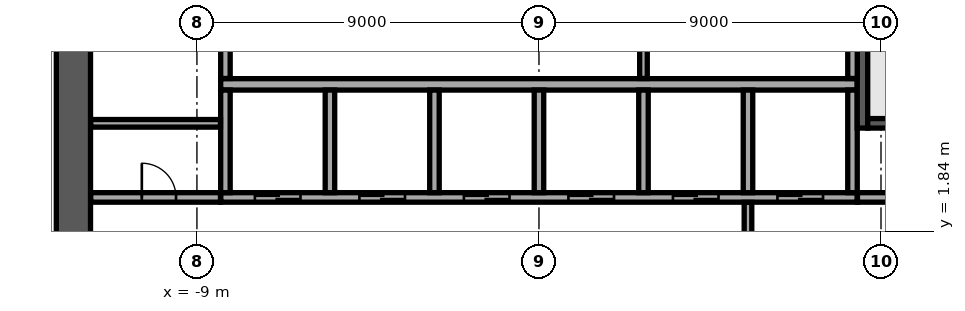
"""IFC4 building model, lengths in metres.
Left out: names, types, materials, properties, quantities, classifications, styles, units other than length and angle.
Written with IfcOpenShell. Run it as: python <this file> out.ifc"""

import sys

from ifc_helpers import new_model, si_unit, direction, frame, frame_2d, origin, place, context, subcontext, project, spatial, rectangle, extrude, element, fill, save


model = new_model("IFC4")
c1 = context("Model", 3, precision=1e-05, world=origin(), true_north=direction((0.0, 1.0)))
c2 = subcontext(c1, "Body", "Model", "MODEL_VIEW")
j1 = project(units=[si_unit("LENGTHUNIT", "METRE"), si_unit("PLANEANGLEUNIT", "RADIAN")], contexts=[c1])
p1 = place(None, origin())
s1 = spatial("IfcSite", under=j1, at=p1, CompositionType="ELEMENT")
p2 = place(p1, origin())
s2 = spatial("IfcBuilding", under=s1, at=p2, CompositionType="ELEMENT")
p3 = place(p2, frame((0.0, 0.0, 197.3)))
s3 = spatial("IfcBuildingStorey", under=s2, at=p3, CompositionType="ELEMENT", Elevation=197.3)
p4 = place(p3, frame((-12.25, -11.8, 0.0), z_axis=(0.0, 0.0, 1.0), x_axis=(0.0, 1.0, 0.0)))
e1 = element("IfcWall", 1, at=p4, inside=s3, PredefinedType="SHEAR", context=c2, shape_type="SweptSolid", body=[
    extrude(rectangle(XDim=23.6, YDim=0.9, at=frame_2d((11.8, 0.0))), origin(), (0.0, 0.0, 1.0), 3.62),
])
p5 = place(p4, frame((10.6, 0.0, 0.0)))
e2 = element("IfcOpeningElement", 2, at=p5, cuts=e1, PredefinedType="OPENING", context=c2, shape_type="SweptSolid", body=[
    extrude(rectangle(XDim=2.4, YDim=2.4, at=frame_2d((1.2, 1.2))), frame((0.0, 0.46, 0.0), z_axis=(0.0, -1.0, 0.0), x_axis=(1.0, 0.0, 0.0)), (0.0, 0.0, 1.0), 0.92),
])
p6 = place(p3, frame((-8.375, 5.7, 0.0), z_axis=(0.0, 0.0, 1.0), x_axis=(1.0, 0.0, 0.0)))
e3 = element("IfcWall", 3, at=p6, inside=s3, PredefinedType="SOLIDWALL", context=c2, shape_type="SweptSolid", body=[
    extrude(rectangle(XDim=16.75, YDim=0.3, at=frame_2d((8.375, 0.0))), origin(), (0.0, 0.0, 1.0), 3.62),
])
p7 = place(p3, frame((-8.375, 2.725, 0.0), z_axis=(0.0, 0.0, 1.0), x_axis=(1.0, 0.0, 0.0)))
e4 = element("IfcWall", 4, at=p7, inside=s3, PredefinedType="SOLIDWALL", context=c2, shape_type="SweptSolid", body=[
    extrude(rectangle(XDim=16.75, YDim=0.25, at=frame_2d((8.375, 0.0))), origin(), (0.0, 0.0, 1.0), 3.62),
])
p8 = place(p7, frame((0.9, 0.0, 0.0)))
e5 = element("IfcOpeningElement", 5, at=p8, cuts=e4, PredefinedType="OPENING", context=c2, shape_type="SweptSolid", body=[
    extrude(rectangle(XDim=1.2, YDim=2.1, at=frame_2d((0.6, 1.05))), frame((0.0, 0.135, 0.0), z_axis=(0.0, -1.0, 0.0), x_axis=(1.0, 0.0, 0.0)), (0.0, 0.0, 1.0), 0.27),
])
p9 = place(p7, frame((3.65, 0.0, 0.0)))
e6 = element("IfcOpeningElement", 6, at=p9, cuts=e4, PredefinedType="OPENING", context=c2, shape_type="SweptSolid", body=[
    extrude(rectangle(XDim=1.2, YDim=2.1, at=frame_2d((0.6, 1.05))), frame((0.0, 0.135, 0.0), z_axis=(0.0, -1.0, 0.0), x_axis=(1.0, 0.0, 0.0)), (0.0, 0.0, 1.0), 0.27),
])
p10 = place(p7, frame((6.4, 0.0, 0.0)))
e7 = element("IfcOpeningElement", 7, at=p10, cuts=e4, PredefinedType="OPENING", context=c2, shape_type="SweptSolid", body=[
    extrude(rectangle(XDim=1.2, YDim=2.1, at=frame_2d((0.6, 1.05))), frame((0.0, 0.135, 0.0), z_axis=(0.0, -1.0, 0.0), x_axis=(1.0, 0.0, 0.0)), (0.0, 0.0, 1.0), 0.27),
])
p11 = place(p7, frame((9.15, 0.0, 0.0)))
e8 = element("IfcOpeningElement", 8, at=p11, cuts=e4, PredefinedType="OPENING", context=c2, shape_type="SweptSolid", body=[
    extrude(rectangle(XDim=1.2, YDim=2.1, at=frame_2d((0.6, 1.05))), frame((0.0, 0.135, 0.0), z_axis=(0.0, -1.0, 0.0), x_axis=(1.0, 0.0, 0.0)), (0.0, 0.0, 1.0), 0.27),
])
p12 = place(p7, frame((11.9, 0.0, 0.0)))
e9 = element("IfcOpeningElement", 9, at=p12, cuts=e4, PredefinedType="OPENING", context=c2, shape_type="SweptSolid", body=[
    extrude(rectangle(XDim=1.2, YDim=2.1, at=frame_2d((0.6, 1.05))), frame((0.0, 0.135, 0.0), z_axis=(0.0, -1.0, 0.0), x_axis=(1.0, 0.0, 0.0)), (0.0, 0.0, 1.0), 0.27),
])
p13 = place(p7, frame((14.65, 0.0, 0.0)))
e10 = element("IfcOpeningElement", 10, at=p13, cuts=e4, PredefinedType="OPENING", context=c2, shape_type="SweptSolid", body=[
    extrude(rectangle(XDim=1.2, YDim=2.1, at=frame_2d((0.6, 1.05))), frame((0.0, 0.135, 0.0), z_axis=(0.0, -1.0, 0.0), x_axis=(1.0, 0.0, 0.0)), (0.0, 0.0, 1.0), 0.27),
])
for number, where, z_axis, x_axis in (
    (11, (-8.25, 2.85, 0.0), (0.0, 0.0, 1.0), (0.0, 1.0, 0.0)),
    (12, (-5.5, 2.85, 0.0), (0.0, 0.0, 1.0), (0.0, 1.0, 0.0)),
    (13, (-2.75, 2.85, 0.0), (0.0, 0.0, 1.0), (0.0, 1.0, 0.0)),
    (14, (0.0, 2.85, 0.0), (0.0, 0.0, 1.0), (0.0, 1.0, 0.0)),
    (15, (2.75, 2.85, 0.0), (0.0, 0.0, 1.0), (0.0, 1.0, 0.0)),
    (16, (5.5, 2.85, 0.0), (0.0, 0.0, 1.0), (0.0, 1.0, 0.0)),
    (17, (8.25, 2.85, 0.0), (0.0, 0.0, 1.0), (0.0, 1.0, 0.0)),
):
    element("IfcWall", number, at=place(p3, frame(where, z_axis=z_axis, x_axis=x_axis)), inside=s3, PredefinedType="SOLIDWALL", context=c2, shape_type="SweptSolid", body=[
        extrude(rectangle(XDim=2.7, YDim=0.25, at=frame_2d((1.35, 0.0))), origin(), (0.0, 0.0, 1.0), 3.62),
    ])
p14 = place(p3, frame((8.512, 4.55, 0.0), z_axis=(0.0, 0.0, 1.0), x_axis=(0.0, 1.0, 0.0)))
e18 = element("IfcWall", 18, at=p14, inside=s3, PredefinedType="SOLIDWALL", context=c2, shape_type="SweptSolid", body=[
    extrude(rectangle(XDim=7.25, YDim=0.275, at=frame_2d((3.625, 0.0))), origin(), (0.0, 0.0, 1.0), 3.62),
])
p15 = place(p14, frame((6.0, 0.0, 0.0)))
e19 = element("IfcOpeningElement", 19, at=p15, cuts=e18, PredefinedType="OPENING", context=c2, shape_type="SweptSolid", body=[
    extrude(rectangle(XDim=1.0, YDim=2.1, at=frame_2d((0.5, 1.05))), frame((0.0, 0.147, 0.0), z_axis=(0.0, -1.0, 0.0), x_axis=(1.0, 0.0, 0.0)), (0.0, 0.0, 1.0), 0.295),
])
p16 = place(p3, frame((8.65, 4.675, 0.0), z_axis=(0.0, 0.0, 1.0), x_axis=(1.0, 0.0, 0.0)))
e20 = element("IfcWall", 20, at=p16, inside=s3, PredefinedType="SOLIDWALL", context=c2, shape_type="SweptSolid", body=[
    extrude(rectangle(XDim=3.15, YDim=0.25, at=frame_2d((1.575, 0.0))), origin(), (0.0, 0.0, 1.0), 3.62),
])
p17 = place(p3, frame((5.5, -2.595, 0.0), z_axis=(0.0, 0.0, 1.0), x_axis=(0.0, 1.0, 0.0)))
e21 = element("IfcWall", 21, at=p17, inside=s3, PredefinedType="PARTITIONING", context=c2, shape_type="SweptSolid", body=[
    extrude(rectangle(XDim=5.19, YDim=0.2, at=frame_2d((2.595, 0.0))), origin(), (0.0, 0.0, 1.0), 3.62),
])
p18 = place(p17, frame((1.395, 0.0, 0.0)))
e22 = element("IfcOpeningElement", 22, at=p18, cuts=e21, PredefinedType="OPENING", context=c2, shape_type="SweptSolid", body=[
    extrude(rectangle(XDim=2.4, YDim=2.4, at=frame_2d((1.2, 1.2))), frame((0.0, 0.11, 0.0), z_axis=(0.0, -1.0, 0.0), x_axis=(1.0, 0.0, 0.0)), (0.0, 0.0, 1.0), 0.22),
])
p19 = place(p3, frame((-11.795, 2.725, 0.0), z_axis=(0.0, 0.0, 1.0), x_axis=(1.0, 0.0, 0.0)))
e23 = element("IfcWall", 23, at=p19, inside=s3, PredefinedType="PARTITIONING", context=c2, shape_type="SweptSolid", body=[
    extrude(rectangle(XDim=3.415, YDim=0.25, at=frame_2d((1.708, 0.0))), origin(), (0.0, 0.0, 1.0), 3.62),
])
p20 = place(p19, frame((1.345, 0.0, 0.0)))
e24 = element("IfcOpeningElement", 24, at=p20, cuts=e23, PredefinedType="OPENING", context=c2, shape_type="SweptSolid", body=[
    extrude(rectangle(XDim=0.9, YDim=2.1, at=frame_2d((0.45, 1.05))), frame((0.0, 0.135, 0.0), z_axis=(0.0, -1.0, 0.0), x_axis=(1.0, 0.0, 0.0)), (0.0, 0.0, 1.0), 0.27),
])
p21 = place(p3, frame((8.38, 2.725, 0.0), z_axis=(0.0, 0.0, 1.0), x_axis=(1.0, 0.0, 0.0)))
e25 = element("IfcWall", 25, at=p21, inside=s3, PredefinedType="PARTITIONING", context=c2, shape_type="SweptSolid", body=[
    extrude(rectangle(XDim=3.415, YDim=0.25, at=frame_2d((1.708, 0.0))), origin(), (0.0, 0.0, 1.0), 3.62),
])
p22 = place(p21, frame((1.17, 0.0, 0.0)))
e26 = element("IfcOpeningElement", 26, at=p22, cuts=e25, PredefinedType="OPENING", context=c2, shape_type="SweptSolid", body=[
    extrude(rectangle(XDim=0.9, YDim=2.1, at=frame_2d((0.45, 1.05))), frame((0.0, 0.135, 0.0), z_axis=(0.0, -1.0, 0.0), x_axis=(1.0, 0.0, 0.0)), (0.0, 0.0, 1.0), 0.27),
])
p23 = place(p3, frame((-11.795, 4.675, 0.0), z_axis=(0.0, 0.0, 1.0), x_axis=(1.0, 0.0, 0.0)))
e27 = element("IfcWall", 27, at=p23, inside=s3, PredefinedType="PARTITIONING", context=c2, shape_type="SweptSolid", body=[
    extrude(rectangle(XDim=3.415, YDim=0.2, at=frame_2d((1.708, 0.0))), origin(), (0.0, 0.0, 1.0), 3.62),
])
p24 = place(p3, frame((-8.25, 5.855, 0.0), z_axis=(0.0, 0.0, 1.0), x_axis=(0.0, 1.0, 0.0)))
e28 = element("IfcWall", 28, at=p24, inside=s3, PredefinedType="PARTITIONING", context=c2, shape_type="SweptSolid", body=[
    extrude(rectangle(XDim=2.69, YDim=0.25, at=frame_2d((1.345, 0.0))), origin(), (0.0, 0.0, 1.0), 3.62),
])
p25 = place(p3, frame((2.75, 5.855, 0.0), z_axis=(0.0, 0.0, 1.0), x_axis=(0.0, 1.0, 0.0)))
e29 = element("IfcWall", 29, at=p25, inside=s3, PredefinedType="PARTITIONING", context=c2, shape_type="SweptSolid", body=[
    extrude(rectangle(XDim=2.69, YDim=0.2, at=frame_2d((1.345, 0.0))), origin(), (0.0, 0.0, 1.0), 3.62),
])
p26 = place(p3, frame((8.25, 5.855, 0.0), z_axis=(0.0, 0.0, 1.0), x_axis=(0.0, 1.0, 0.0)))
e30 = element("IfcWall", 30, at=p26, inside=s3, PredefinedType="PARTITIONING", context=c2, shape_type="SweptSolid", body=[
    extrude(rectangle(XDim=2.69, YDim=0.25, at=frame_2d((1.345, 0.0))), origin(), (0.0, 0.0, 1.0), 3.62),
])
p27 = place(p3, frame((1.073, 34.773, 0.0), z_axis=(0.0, 0.0, 1.0), x_axis=(-0.731351780381, -0.682000420333, 0.0)))
e31 = element("IfcWall", 31, at=p27, inside=s3, PredefinedType="STANDARD", context=c2, shape_type="SweptSolid", body=[
    extrude(rectangle(XDim=49.0, YDim=0.6, at=frame_2d((24.5, 0.0))), origin(), (0.0, 0.0, 1.0), 3.62),
])
p28 = place(p27, frame((1.227, 0.0, 0.9)))
e32 = element("IfcOpeningElement", 32, at=p28, cuts=e31, PredefinedType="OPENING", context=c2, shape_type="SweptSolid", body=[
    extrude(rectangle(XDim=2.0, YDim=2.1, at=frame_2d((1.0, 1.05))), frame((0.0, 0.31, 0.0), z_axis=(0.0, -1.0, 0.0), x_axis=(1.0, 0.0, 0.0)), (0.0, 0.0, 1.0), 0.62),
])
p29 = place(p27, frame((5.682, 0.0, 0.9)))
e33 = element("IfcOpeningElement", 33, at=p29, cuts=e31, PredefinedType="OPENING", context=c2, shape_type="SweptSolid", body=[
    extrude(rectangle(XDim=2.0, YDim=2.1, at=frame_2d((1.0, 1.05))), frame((0.0, 0.31, 0.0), z_axis=(0.0, -1.0, 0.0), x_axis=(1.0, 0.0, 0.0)), (0.0, 0.0, 1.0), 0.62),
])
p30 = place(p27, frame((14.591, 0.0, 0.9)))
e34 = element("IfcOpeningElement", 34, at=p30, cuts=e31, PredefinedType="OPENING", context=c2, shape_type="SweptSolid", body=[
    extrude(rectangle(XDim=2.0, YDim=2.1, at=frame_2d((1.0, 1.05))), frame((0.0, 0.31, 0.0), z_axis=(0.0, -1.0, 0.0), x_axis=(1.0, 0.0, 0.0)), (0.0, 0.0, 1.0), 0.62),
])
p31 = place(p27, frame((19.045, 0.0, 0.9)))
e35 = element("IfcOpeningElement", 35, at=p31, cuts=e31, PredefinedType="OPENING", context=c2, shape_type="SweptSolid", body=[
    extrude(rectangle(XDim=2.0, YDim=2.1, at=frame_2d((1.0, 1.05))), frame((0.0, 0.31, 0.0), z_axis=(0.0, -1.0, 0.0), x_axis=(1.0, 0.0, 0.0)), (0.0, 0.0, 1.0), 0.62),
])
p32 = place(p27, frame((23.5, 0.0, 0.9)))
e36 = element("IfcOpeningElement", 36, at=p32, cuts=e31, PredefinedType="OPENING", context=c2, shape_type="SweptSolid", body=[
    extrude(rectangle(XDim=2.0, YDim=2.1, at=frame_2d((1.0, 1.05))), frame((0.0, 0.31, 0.0), z_axis=(0.0, -1.0, 0.0), x_axis=(1.0, 0.0, 0.0)), (0.0, 0.0, 1.0), 0.62),
])
p33 = place(p27, frame((27.955, 0.0, 0.9)))
e37 = element("IfcOpeningElement", 37, at=p33, cuts=e31, PredefinedType="OPENING", context=c2, shape_type="SweptSolid", body=[
    extrude(rectangle(XDim=2.0, YDim=2.1, at=frame_2d((1.0, 1.05))), frame((0.0, 0.31, 0.0), z_axis=(0.0, -1.0, 0.0), x_axis=(1.0, 0.0, 0.0)), (0.0, 0.0, 1.0), 0.62),
])
p34 = place(p27, frame((32.409, 0.0, 0.9)))
e38 = element("IfcOpeningElement", 38, at=p34, cuts=e31, PredefinedType="OPENING", context=c2, shape_type="SweptSolid", body=[
    extrude(rectangle(XDim=2.0, YDim=2.1, at=frame_2d((1.0, 1.05))), frame((0.0, 0.31, 0.0), z_axis=(0.0, -1.0, 0.0), x_axis=(1.0, 0.0, 0.0)), (0.0, 0.0, 1.0), 0.62),
])
p35 = place(p27, frame((36.864, 0.0, 0.9)))
e39 = element("IfcOpeningElement", 39, at=p35, cuts=e31, PredefinedType="OPENING", context=c2, shape_type="SweptSolid", body=[
    extrude(rectangle(XDim=2.0, YDim=2.1, at=frame_2d((1.0, 1.05))), frame((0.0, 0.31, 0.0), z_axis=(0.0, -1.0, 0.0), x_axis=(1.0, 0.0, 0.0)), (0.0, 0.0, 1.0), 0.62),
])
p36 = place(p27, frame((41.318, 0.0, 0.9)))
e40 = element("IfcOpeningElement", 40, at=p36, cuts=e31, PredefinedType="OPENING", context=c2, shape_type="SweptSolid", body=[
    extrude(rectangle(XDim=2.0, YDim=2.1, at=frame_2d((1.0, 1.05))), frame((0.0, 0.31, 0.0), z_axis=(0.0, -1.0, 0.0), x_axis=(1.0, 0.0, 0.0)), (0.0, 0.0, 1.0), 0.62),
])
p37 = place(p27, frame((45.773, 0.0, 0.9)))
e41 = element("IfcOpeningElement", 41, at=p37, cuts=e31, PredefinedType="OPENING", context=c2, shape_type="SweptSolid", body=[
    extrude(rectangle(XDim=2.0, YDim=2.1, at=frame_2d((1.0, 1.05))), frame((0.0, 0.31, 0.0), z_axis=(0.0, -1.0, 0.0), x_axis=(1.0, 0.0, 0.0)), (0.0, 0.0, 1.0), 0.62),
])
p38 = place(p3, frame((35.02, 5.994, 0.0), z_axis=(0.0, 0.0, 1.0), x_axis=(-0.682002361324, 0.731349970362, 0.0)))
e42 = element("IfcWall", 42, at=p38, inside=s3, PredefinedType="STANDARD", context=c2, shape_type="SweptSolid", body=[
    extrude(rectangle(XDim=39.0, YDim=0.6, at=frame_2d((19.5, 0.0))), origin(), (0.0, 0.0, 1.0), 3.62),
])
p39 = place(p38, frame((1.217, 0.0, 0.9)))
e43 = element("IfcOpeningElement", 43, at=p39, cuts=e42, PredefinedType="OPENING", context=c2, shape_type="SweptSolid", body=[
    extrude(rectangle(XDim=1.9, YDim=2.1, at=frame_2d((0.95, 1.05))), frame((0.0, 0.31, 0.0), z_axis=(0.0, -1.0, 0.0), x_axis=(1.0, 0.0, 0.0)), (0.0, 0.0, 1.0), 0.62),
])
p40 = place(p38, frame((5.55, 0.0, 0.9)))
e44 = element("IfcOpeningElement", 44, at=p40, cuts=e42, PredefinedType="OPENING", context=c2, shape_type="SweptSolid", body=[
    extrude(rectangle(XDim=1.9, YDim=2.1, at=frame_2d((0.95, 1.05))), frame((0.0, 0.31, 0.0), z_axis=(0.0, -1.0, 0.0), x_axis=(1.0, 0.0, 0.0)), (0.0, 0.0, 1.0), 0.62),
])
p41 = place(p38, frame((9.883, 0.0, 0.9)))
e45 = element("IfcOpeningElement", 45, at=p41, cuts=e42, PredefinedType="OPENING", context=c2, shape_type="SweptSolid", body=[
    extrude(rectangle(XDim=1.9, YDim=2.1, at=frame_2d((0.95, 1.05))), frame((0.0, 0.31, 0.0), z_axis=(0.0, -1.0, 0.0), x_axis=(1.0, 0.0, 0.0)), (0.0, 0.0, 1.0), 0.62),
])
p42 = place(p38, frame((14.217, 0.0, 0.9)))
e46 = element("IfcOpeningElement", 46, at=p42, cuts=e42, PredefinedType="OPENING", context=c2, shape_type="SweptSolid", body=[
    extrude(rectangle(XDim=1.9, YDim=2.1, at=frame_2d((0.95, 1.05))), frame((0.0, 0.31, 0.0), z_axis=(0.0, -1.0, 0.0), x_axis=(1.0, 0.0, 0.0)), (0.0, 0.0, 1.0), 0.62),
])
p43 = place(p38, frame((18.55, 0.0, 0.9)))
e47 = element("IfcOpeningElement", 47, at=p43, cuts=e42, PredefinedType="OPENING", context=c2, shape_type="SweptSolid", body=[
    extrude(rectangle(XDim=1.9, YDim=2.1, at=frame_2d((0.95, 1.05))), frame((0.0, 0.31, 0.0), z_axis=(0.0, -1.0, 0.0), x_axis=(1.0, 0.0, 0.0)), (0.0, 0.0, 1.0), 0.62),
])
p44 = place(p38, frame((22.883, 0.0, 0.9)))
e48 = element("IfcOpeningElement", 48, at=p44, cuts=e42, PredefinedType="OPENING", context=c2, shape_type="SweptSolid", body=[
    extrude(rectangle(XDim=1.9, YDim=2.1, at=frame_2d((0.95, 1.05))), frame((0.0, 0.31, 0.0), z_axis=(0.0, -1.0, 0.0), x_axis=(1.0, 0.0, 0.0)), (0.0, 0.0, 1.0), 0.62),
])
p45 = place(p38, frame((27.217, 0.0, 0.9)))
e49 = element("IfcOpeningElement", 49, at=p45, cuts=e42, PredefinedType="OPENING", context=c2, shape_type="SweptSolid", body=[
    extrude(rectangle(XDim=1.9, YDim=2.1, at=frame_2d((0.95, 1.05))), frame((0.0, 0.31, 0.0), z_axis=(0.0, -1.0, 0.0), x_axis=(1.0, 0.0, 0.0)), (0.0, 0.0, 1.0), 0.62),
])
p46 = place(p38, frame((31.55, 0.0, 0.9)))
e50 = element("IfcOpeningElement", 50, at=p46, cuts=e42, PredefinedType="OPENING", context=c2, shape_type="SweptSolid", body=[
    extrude(rectangle(XDim=1.9, YDim=2.1, at=frame_2d((0.95, 1.05))), frame((0.0, 0.31, 0.0), z_axis=(0.0, -1.0, 0.0), x_axis=(1.0, 0.0, 0.0)), (0.0, 0.0, 1.0), 0.62),
])
p47 = place(p38, frame((35.883, 0.0, 0.9)))
e51 = element("IfcOpeningElement", 51, at=p47, cuts=e42, PredefinedType="OPENING", context=c2, shape_type="SweptSolid", body=[
    extrude(rectangle(XDim=1.9, YDim=2.1, at=frame_2d((0.95, 1.05))), frame((0.0, 0.31, 0.0), z_axis=(0.0, -1.0, 0.0), x_axis=(1.0, 0.0, 0.0)), (0.0, 0.0, 1.0), 0.62),
])
p48 = place(p3, frame((-24.623, 3.301, 0.0), z_axis=(0.0, 0.0, 1.0), x_axis=(0.731351215564, 0.68200102602, 0.0)))
e52 = element("IfcWall", 52, at=p48, inside=s3, PredefinedType="PARTITIONING", context=c2, shape_type="SweptSolid", body=[
    extrude(rectangle(XDim=31.513, YDim=0.15, at=frame_2d((15.757, 0.0))), origin(), (0.0, 0.0, 1.0), 3.17),
])
p49 = place(p48, frame((1.05, 0.0, 0.0)))
e53 = element("IfcOpeningElement", 53, at=p49, cuts=e52, PredefinedType="OPENING", context=c2, shape_type="SweptSolid", body=[
    extrude(rectangle(XDim=1.8, YDim=2.1, at=frame_2d((0.9, 1.05))), frame((0.0, 0.085, 0.0), z_axis=(0.0, -1.0, 0.0), x_axis=(1.0, 0.0, 0.0)), (0.0, 0.0, 1.0), 0.17),
])
p50 = place(p48, frame((5.55, 0.0, 0.0)))
e54 = element("IfcOpeningElement", 54, at=p50, cuts=e52, PredefinedType="OPENING", context=c2, shape_type="SweptSolid", body=[
    extrude(rectangle(XDim=1.0, YDim=2.1, at=frame_2d((0.5, 1.05))), frame((0.0, 0.085, 0.0), z_axis=(0.0, -1.0, 0.0), x_axis=(1.0, 0.0, 0.0)), (0.0, 0.0, 1.0), 0.17),
])
p51 = place(p48, frame((10.917, 0.0, 0.0)))
e55 = element("IfcOpeningElement", 55, at=p51, cuts=e52, PredefinedType="OPENING", context=c2, shape_type="SweptSolid", body=[
    extrude(rectangle(XDim=1.0, YDim=2.1, at=frame_2d((0.5, 1.05))), frame((0.0, 0.085, 0.0), z_axis=(0.0, -1.0, 0.0), x_axis=(1.0, 0.0, 0.0)), (0.0, 0.0, 1.0), 0.17),
])
p52 = place(p48, frame((20.812, 0.0, 0.0)))
e56 = element("IfcOpeningElement", 56, at=p52, cuts=e52, PredefinedType="OPENING", context=c2, shape_type="SweptSolid", body=[
    extrude(rectangle(XDim=1.0, YDim=2.1, at=frame_2d((0.5, 1.05))), frame((0.0, 0.085, 0.0), z_axis=(0.0, -1.0, 0.0), x_axis=(1.0, 0.0, 0.0)), (0.0, 0.0, 1.0), 0.17),
])
p53 = place(p8, origin())
e57 = element("IfcDoor", 57, at=p53, inside=s3, OperationType="DOUBLE_DOOR_SLIDING", PredefinedType="DOOR", context=c2, shape_type="SweptSolid", body=[
    extrude(rectangle(XDim=1.2, YDim=2.1, at=frame_2d((0.6, 1.05))), frame((0.0, 0.025, 0.0), z_axis=(0.0, -1.0, 0.0), x_axis=(1.0, 0.0, 0.0)), (0.0, 0.0, 1.0), 0.05),
])
fill(e5, e57)
p54 = place(p9, origin())
e58 = element("IfcDoor", 58, at=p54, inside=s3, OperationType="DOUBLE_DOOR_SLIDING", PredefinedType="DOOR", context=c2, shape_type="SweptSolid", body=[
    extrude(rectangle(XDim=1.2, YDim=2.1, at=frame_2d((0.6, 1.05))), frame((0.0, 0.025, 0.0), z_axis=(0.0, -1.0, 0.0), x_axis=(1.0, 0.0, 0.0)), (0.0, 0.0, 1.0), 0.05),
])
fill(e6, e58)
p55 = place(p10, origin())
e59 = element("IfcDoor", 59, at=p55, inside=s3, OperationType="DOUBLE_DOOR_SLIDING", PredefinedType="DOOR", context=c2, shape_type="SweptSolid", body=[
    extrude(rectangle(XDim=1.2, YDim=2.1, at=frame_2d((0.6, 1.05))), frame((0.0, 0.025, 0.0), z_axis=(0.0, -1.0, 0.0), x_axis=(1.0, 0.0, 0.0)), (0.0, 0.0, 1.0), 0.05),
])
fill(e7, e59)
p56 = place(p11, origin())
e60 = element("IfcDoor", 60, at=p56, inside=s3, OperationType="DOUBLE_DOOR_SLIDING", PredefinedType="DOOR", context=c2, shape_type="SweptSolid", body=[
    extrude(rectangle(XDim=1.2, YDim=2.1, at=frame_2d((0.6, 1.05))), frame((0.0, 0.025, 0.0), z_axis=(0.0, -1.0, 0.0), x_axis=(1.0, 0.0, 0.0)), (0.0, 0.0, 1.0), 0.05),
])
fill(e8, e60)
p57 = place(p12, origin())
e61 = element("IfcDoor", 61, at=p57, inside=s3, OperationType="DOUBLE_DOOR_SLIDING", PredefinedType="DOOR", context=c2, shape_type="SweptSolid", body=[
    extrude(rectangle(XDim=1.2, YDim=2.1, at=frame_2d((0.6, 1.05))), frame((0.0, 0.025, 0.0), z_axis=(0.0, -1.0, 0.0), x_axis=(1.0, 0.0, 0.0)), (0.0, 0.0, 1.0), 0.05),
])
fill(e9, e61)
p58 = place(p13, origin())
e62 = element("IfcDoor", 62, at=p58, inside=s3, OperationType="DOUBLE_DOOR_SLIDING", PredefinedType="DOOR", context=c2, shape_type="SweptSolid", body=[
    extrude(rectangle(XDim=1.2, YDim=2.1, at=frame_2d((0.6, 1.05))), frame((0.0, 0.025, 0.0), z_axis=(0.0, -1.0, 0.0), x_axis=(1.0, 0.0, 0.0)), (0.0, 0.0, 1.0), 0.05),
])
fill(e10, e62)
p59 = place(p20, origin())
e63 = element("IfcDoor", 63, at=p59, inside=s3, OperationType="SINGLE_SWING_LEFT", PredefinedType="DOOR", context=c2, shape_type="SweptSolid", body=[
    extrude(rectangle(XDim=0.9, YDim=2.1, at=frame_2d((0.45, 1.05))), frame((0.0, 0.025, 0.0), z_axis=(0.0, -1.0, 0.0), x_axis=(1.0, 0.0, 0.0)), (0.0, 0.0, 1.0), 0.05),
])
fill(e24, e63)
save(model, sys.argv[1])
